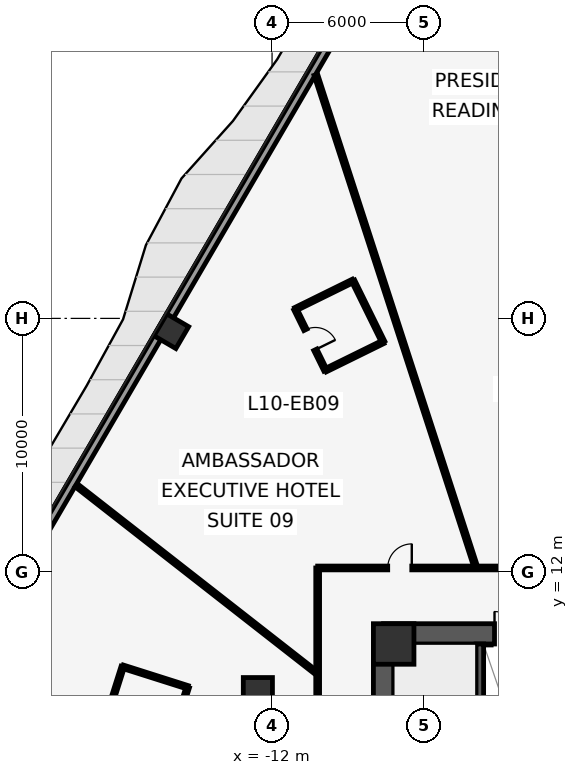
"""IFC4 building model, lengths in metres.
Left out: names, types, materials, properties, quantities, classifications, styles, units other than length and angle.
Written with IfcOpenShell. Run it as: python <this file> out.ifc"""

import sys

from ifc_helpers import new_model, si_unit, direction, frame, frame_2d, origin, origin_2d, place, context, subcontext, project, spatial, rectangle, hollow_rectangle, extrude, element, fill, save


model = new_model("IFC4")
c1 = context("Model", 3, precision=1e-05, world=origin(), true_north=direction((0.0, 1.0)))
c2 = subcontext(c1, "Body", "Model", "MODEL_VIEW")
j1 = project(units=[si_unit("LENGTHUNIT", "METRE"), si_unit("PLANEANGLEUNIT", "RADIAN")], contexts=[c1])
p1 = place(None, origin())
s1 = spatial("IfcSite", under=j1, at=p1, CompositionType="ELEMENT")
p2 = place(p1, origin())
s2 = spatial("IfcBuilding", under=s1, at=p2, CompositionType="ELEMENT")
p3 = place(p2, frame((0.0, 0.0, 50.4)))
s3 = spatial("IfcBuildingStorey", under=s2, at=p3, CompositionType="ELEMENT", Elevation=50.4)
p4 = place(p3, frame((-7.6, 9.55, 0.0), z_axis=(0.0, 0.0, 1.0), x_axis=(1.0, 0.0, 0.0)))
e1 = element("IfcWall", 1, at=p4, inside=s3, PredefinedType="SHEAR", context=c2, shape_type="SweptSolid", body=[
    extrude(rectangle(XDim=15.2, YDim=0.8, at=frame_2d((7.6, 0.0))), origin(), (0.0, 0.0, 1.0), 3.75),
])
p5 = place(p4, frame((7.05, 0.0, 0.0)))
e2 = element("IfcOpeningElement", 2, at=p5, cuts=e1, PredefinedType="OPENING", context=c2, shape_type="SweptSolid", body=[
    extrude(rectangle(XDim=1.1, YDim=2.15, at=frame_2d((0.55, 1.075))), frame((0.0, 0.41, 0.0), z_axis=(0.0, -1.0, 0.0), x_axis=(1.0, 0.0, 0.0)), (0.0, 0.0, 1.0), 0.82),
])
p6 = place(p4, frame((4.38, 0.0, 0.0)))
e3 = element("IfcOpeningElement", 3, at=p6, cuts=e1, PredefinedType="OPENING", context=c2, shape_type="SweptSolid", body=[
    extrude(rectangle(XDim=0.88, YDim=2.15, at=frame_2d((0.44, 1.075))), frame((0.0, 0.41, 0.0), z_axis=(0.0, -1.0, 0.0), x_axis=(1.0, 0.0, 0.0)), (0.0, 0.0, 1.0), 0.82),
])
p7 = place(p4, frame((9.94, 0.0, 0.0)))
e4 = element("IfcOpeningElement", 4, at=p7, cuts=e1, PredefinedType="OPENING", context=c2, shape_type="SweptSolid", body=[
    extrude(rectangle(XDim=0.88, YDim=2.15, at=frame_2d((0.44, 1.075))), frame((0.0, 0.41, 0.0), z_axis=(0.0, -1.0, 0.0), x_axis=(1.0, 0.0, 0.0)), (0.0, 0.0, 1.0), 0.82),
])
p8 = place(p3, frame((-3.8, 1.45, 0.0), z_axis=(0.0, 0.0, 1.0), x_axis=(0.0, 1.0, 0.0)))
e5 = element("IfcWall", 5, at=p8, inside=s3, PredefinedType="SHEAR", context=c2, shape_type="SweptSolid", body=[
    extrude(rectangle(XDim=7.7, YDim=0.3, at=frame_2d((3.85, 0.0))), origin(), (0.0, 0.0, 1.0), 3.75),
])
p9 = place(p3, frame((-7.6, 0.1, 0.0), z_axis=(0.0, 0.0, 1.0), x_axis=(0.0, 1.0, 0.0)))
e6 = element("IfcWall", 6, at=p9, inside=s3, PredefinedType="SHEAR", context=c2, shape_type="SweptSolid", body=[
    extrude(rectangle(XDim=9.05, YDim=0.8, at=frame_2d((4.525, 0.0))), origin(), (0.0, 0.0, 1.0), 3.75),
])
p10 = place(p3, frame((-7.2, 9.15, 0.0), z_axis=(0.0, 0.0, 1.0), x_axis=(1.0, 0.0, 0.0)))
e7 = element("IfcColumn", 7, at=p10, inside=s3, PredefinedType="COLUMN", context=c2, shape_type="SweptSolid", body=[
    extrude(rectangle(XDim=1.6, YDim=1.6, at=origin_2d()), origin(), (0.0, 0.0, 1.0), 4.0),
])
p11 = place(p3, frame((-12.56, 7.25, 0.0), z_axis=(0.0, 0.0, 1.0), x_axis=(1.0, 0.0, 0.0)))
e8 = element("IfcColumn", 8, at=p11, inside=s3, PredefinedType="COLUMN", context=c2, shape_type="SweptSolid", body=[
    extrude(rectangle(XDim=1.15, YDim=1.15, at=origin_2d()), origin(), (0.0, 0.0, 1.0), 4.0),
])
p12 = place(p3, frame((-15.976, 21.494, 0.0), z_axis=(0.0, 0.0, 1.0), x_axis=(0.50437692518, 0.863483594138, 0.0)))
e9 = element("IfcColumn", 9, at=p12, inside=s3, PredefinedType="COLUMN", context=c2, shape_type="SweptSolid", body=[
    extrude(hollow_rectangle(XDim=1.0, YDim=1.0, WallThickness=0.06, at=origin_2d()), origin(), (0.0, 0.0, 1.0), 4.0),
])
p13 = place(p3, frame((-38.726, -16.773, 0.0), z_axis=(0.0, 0.0, 1.0), x_axis=(0.504213113214, 0.863579258935, 0.0)))
e10 = element("IfcWall", 10, at=p13, inside=s3, PredefinedType="STANDARD", context=c2, shape_type="SweptSolid", body=[
    extrude(rectangle(XDim=67.041, YDim=0.32, at=frame_2d((33.521, 0.0))), origin(), (0.0, 0.0, 1.0), 3.75),
])
p14 = place(p13, frame((33.021, 0.0, 0.0)))
e11 = element("IfcOpeningElement", 11, at=p14, cuts=e10, PredefinedType="OPENING", context=c2, shape_type="SweptSolid", body=[
    extrude(rectangle(XDim=1.0, YDim=2.15, at=frame_2d((0.5, 1.075))), frame((0.0, 0.17, 0.0), z_axis=(0.0, -1.0, 0.0), x_axis=(1.0, 0.0, 0.0)), (0.0, 0.0, 1.0), 0.34),
])
p15 = place(p3, frame((-10.2, 12.15, 0.0), z_axis=(0.0, 0.0, 1.0), x_axis=(1.0, 0.0, 0.0)))
e12 = element("IfcWall", 12, at=p15, inside=s3, PredefinedType="PARTITIONING", context=c2, shape_type="SweptSolid", body=[
    extrude(rectangle(XDim=20.4, YDim=0.15, at=frame_2d((10.2, 0.0))), origin(), (0.0, 0.0, 1.0), 3.75),
])
p16 = place(p15, frame((15.998, 0.0, 0.0)))
e13 = element("IfcOpeningElement", 13, at=p16, cuts=e12, PredefinedType="OPENING", context=c2, shape_type="SweptSolid", body=[
    extrude(rectangle(XDim=0.95, YDim=2.15, at=frame_2d((0.475, 1.075))), frame((0.0, 0.085, 0.0), z_axis=(0.0, -1.0, 0.0), x_axis=(1.0, 0.0, 0.0)), (0.0, 0.0, 1.0), 0.17),
])
p17 = place(p15, frame((9.038, 0.0, 0.0)))
e14 = element("IfcOpeningElement", 14, at=p17, cuts=e12, PredefinedType="OPENING", context=c2, shape_type="SweptSolid", body=[
    extrude(rectangle(XDim=0.95, YDim=2.15, at=frame_2d((0.475, 1.075))), frame((0.0, 0.085, 0.0), z_axis=(0.0, -1.0, 0.0), x_axis=(1.0, 0.0, 0.0)), (0.0, 0.0, 1.0), 0.17),
])
p18 = place(p15, frame((2.764, 0.0, 0.0)))
e15 = element("IfcOpeningElement", 15, at=p18, cuts=e12, PredefinedType="OPENING", context=c2, shape_type="SweptSolid", body=[
    extrude(rectangle(XDim=0.95, YDim=2.15, at=frame_2d((0.475, 1.075))), frame((0.0, 0.085, 0.0), z_axis=(0.0, -1.0, 0.0), x_axis=(1.0, 0.0, 0.0)), (0.0, 0.0, 1.0), 0.17),
])
p19 = place(p3, frame((-10.2, -11.85, 0.0), z_axis=(0.0, 0.0, 1.0), x_axis=(0.0, 1.0, 0.0)))
e16 = element("IfcWall", 16, at=p19, inside=s3, PredefinedType="PARTITIONING", context=c2, shape_type="SweptSolid", body=[
    extrude(rectangle(XDim=24.0, YDim=0.15, at=frame_2d((12.0, 0.0))), origin(), (0.0, 0.0, 1.0), 3.75),
])
p20 = place(p19, frame((8.765, 0.0, 0.0)))
e17 = element("IfcOpeningElement", 17, at=p20, cuts=e16, PredefinedType="OPENING", context=c2, shape_type="SweptSolid", body=[
    extrude(rectangle(XDim=0.95, YDim=2.15, at=frame_2d((0.475, 1.075))), frame((0.0, 0.085, 0.0), z_axis=(0.0, -1.0, 0.0), x_axis=(1.0, 0.0, 0.0)), (0.0, 0.0, 1.0), 0.17),
])
p21 = place(p19, frame((2.604, 0.0, 0.0)))
e18 = element("IfcOpeningElement", 18, at=p21, cuts=e16, PredefinedType="OPENING", context=c2, shape_type="SweptSolid", body=[
    extrude(rectangle(XDim=0.95, YDim=2.15, at=frame_2d((0.475, 1.075))), frame((0.0, 0.085, 0.0), z_axis=(0.0, -1.0, 0.0), x_axis=(1.0, 0.0, 0.0)), (0.0, 0.0, 1.0), 0.17),
])
p22 = place(p19, frame((15.759, 0.0, 0.0)))
e19 = element("IfcOpeningElement", 19, at=p22, cuts=e16, PredefinedType="OPENING", context=c2, shape_type="SweptSolid", body=[
    extrude(rectangle(XDim=0.95, YDim=2.15, at=frame_2d((0.475, 1.075))), frame((0.0, 0.085, 0.0), z_axis=(0.0, -1.0, 0.0), x_axis=(1.0, 0.0, 0.0)), (0.0, 0.0, 1.0), 0.17),
])
p23 = place(p3, frame((-3.982, 12.255, 0.0), z_axis=(0.0, 0.0, 1.0), x_axis=(-0.309011216684, 0.951058393561, 0.0)))
e20 = element("IfcWall", 20, at=p23, inside=s3, PredefinedType="PARTITIONING", context=c2, shape_type="SweptSolid", body=[
    extrude(rectangle(XDim=20.354, YDim=0.15, at=frame_2d((10.177, 0.0))), origin(), (0.0, 0.0, 1.0), 3.75),
])
p24 = place(p3, frame((-10.305, 8.051, 0.0), z_axis=(0.0, 0.0, 1.0), x_axis=(-0.788008281042, 0.615664640051, 0.0)))
e21 = element("IfcWall", 21, at=p24, inside=s3, PredefinedType="PARTITIONING", context=c2, shape_type="SweptSolid", body=[
    extrude(rectangle(XDim=11.96, YDim=0.15, at=frame_2d((5.98, 0.0))), origin(), (0.0, 0.0, 1.0), 3.75),
])
p25 = place(p3, frame((-7.614, 21.071, 0.0), z_axis=(0.0, 0.0, 1.0), x_axis=(-0.441468216104, 0.89727688824, 0.0)))
e22 = element("IfcWall", 22, at=p25, inside=s3, PredefinedType="PARTITIONING", context=c2, shape_type="SweptSolid", body=[
    extrude(rectangle(XDim=2.69, YDim=0.14, at=frame_2d((1.345, 0.0))), origin(), (0.0, 0.0, 1.0), 3.75),
])
p26 = place(p3, frame((-8.802, 23.485, 0.0), z_axis=(0.0, 0.0, 1.0), x_axis=(-0.897291929889, -0.441437642886, 0.0)))
e23 = element("IfcWall", 23, at=p26, inside=s3, PredefinedType="PARTITIONING", context=c2, shape_type="SweptSolid", body=[
    extrude(rectangle(XDim=2.54, YDim=0.14, at=frame_2d((1.27, 0.0))), origin(), (0.0, 0.0, 1.0), 3.75),
])
p27 = place(p3, frame((-11.081, 22.363, 0.0), z_axis=(0.0, 0.0, 1.0), x_axis=(0.441541285032, -0.897240933982, 0.0)))
e24 = element("IfcWall", 24, at=p27, inside=s3, PredefinedType="PARTITIONING", context=c2, shape_type="SweptSolid", body=[
    extrude(rectangle(XDim=2.69, YDim=0.14, at=frame_2d((1.345, 0.0))), origin(), (0.0, 0.0, 1.0), 3.75),
])
p28 = place(p27, frame((0.905, 0.0, 0.0)))
e25 = element("IfcOpeningElement", 25, at=p28, cuts=e24, PredefinedType="OPENING", context=c2, shape_type="SweptSolid", body=[
    extrude(rectangle(XDim=0.88, YDim=2.1, at=frame_2d((0.44, 1.05))), frame((0.0, 0.08, 0.0), z_axis=(0.0, -1.0, 0.0), x_axis=(1.0, 0.0, 0.0)), (0.0, 0.0, 1.0), 0.16),
])
p29 = place(p3, frame((-9.893, 19.95, 0.0), z_axis=(0.0, 0.0, 1.0), x_axis=(0.897273198593, 0.441475715173, 0.0)))
e26 = element("IfcWall", 26, at=p29, inside=s3, PredefinedType="PARTITIONING", context=c2, shape_type="SweptSolid", body=[
    extrude(rectangle(XDim=2.54, YDim=0.14, at=frame_2d((1.27, 0.0))), origin(), (0.0, 0.0, 1.0), 3.75),
])
p30 = place(p3, frame((-15.328, 7.44, 0.0), z_axis=(0.0, 0.0, 1.0), x_axis=(-0.953201932401, 0.302334377912, 0.0)))
e27 = element("IfcWall", 27, at=p30, inside=s3, PredefinedType="PARTITIONING", context=c2, shape_type="SweptSolid", body=[
    extrude(rectangle(XDim=2.69, YDim=0.14, at=frame_2d((1.345, 0.0))), origin(), (0.0, 0.0, 1.0), 3.75),
])
p31 = place(p3, frame((-17.892, 8.253, 0.0), z_axis=(0.0, 0.0, 1.0), x_axis=(-0.302469641391, -0.953159019281, 0.0)))
e28 = element("IfcWall", 28, at=p31, inside=s3, PredefinedType="PARTITIONING", context=c2, shape_type="SweptSolid", body=[
    extrude(rectangle(XDim=2.54, YDim=0.14, at=frame_2d((1.27, 0.0))), origin(), (0.0, 0.0, 1.0), 3.254),
])
p32 = place(p3, frame((-16.096, 5.019, 0.0), z_axis=(0.0, 0.0, 1.0), x_axis=(0.302382317173, 0.953186725811, 0.0)))
e29 = element("IfcWall", 29, at=p32, inside=s3, PredefinedType="PARTITIONING", context=c2, shape_type="SweptSolid", body=[
    extrude(rectangle(XDim=2.54, YDim=0.14, at=frame_2d((1.27, 0.0))), origin(), (0.0, 0.0, 1.0), 3.75),
])
p33 = place(p6, origin())
e30 = element("IfcDoor", 30, at=p33, inside=s3, OperationType="SINGLE_SWING_LEFT", PredefinedType="DOOR", context=c2, shape_type="SweptSolid", body=[
    extrude(rectangle(XDim=0.88, YDim=2.15, at=frame_2d((0.44, 1.075))), frame((0.0, 0.025, 0.0), z_axis=(0.0, -1.0, 0.0), x_axis=(1.0, 0.0, 0.0)), (0.0, 0.0, 1.0), 0.05),
])
fill(e3, e30)
p34 = place(p28, origin())
e31 = element("IfcDoor", 31, at=p34, inside=s3, OperationType="SINGLE_SWING_RIGHT", PredefinedType="DOOR", context=c2, shape_type="SweptSolid", body=[
    extrude(rectangle(XDim=0.88, YDim=2.1, at=frame_2d((0.44, 1.05))), frame((0.0, 0.025, 0.0), z_axis=(0.0, -1.0, 0.0), x_axis=(1.0, 0.0, 0.0)), (0.0, 0.0, 1.0), 0.05),
])
fill(e25, e31)
p35 = place(p18, origin())
e32 = element("IfcDoor", 32, at=p35, inside=s3, OperationType="SINGLE_SWING_RIGHT", PredefinedType="DOOR", context=c2, shape_type="SweptSolid", body=[
    extrude(rectangle(XDim=0.95, YDim=2.15, at=frame_2d((0.475, 1.075))), frame((0.0, 0.025, 0.0), z_axis=(0.0, -1.0, 0.0), x_axis=(1.0, 0.0, 0.0)), (0.0, 0.0, 1.0), 0.05),
])
fill(e15, e32)
save(model, sys.argv[1])
